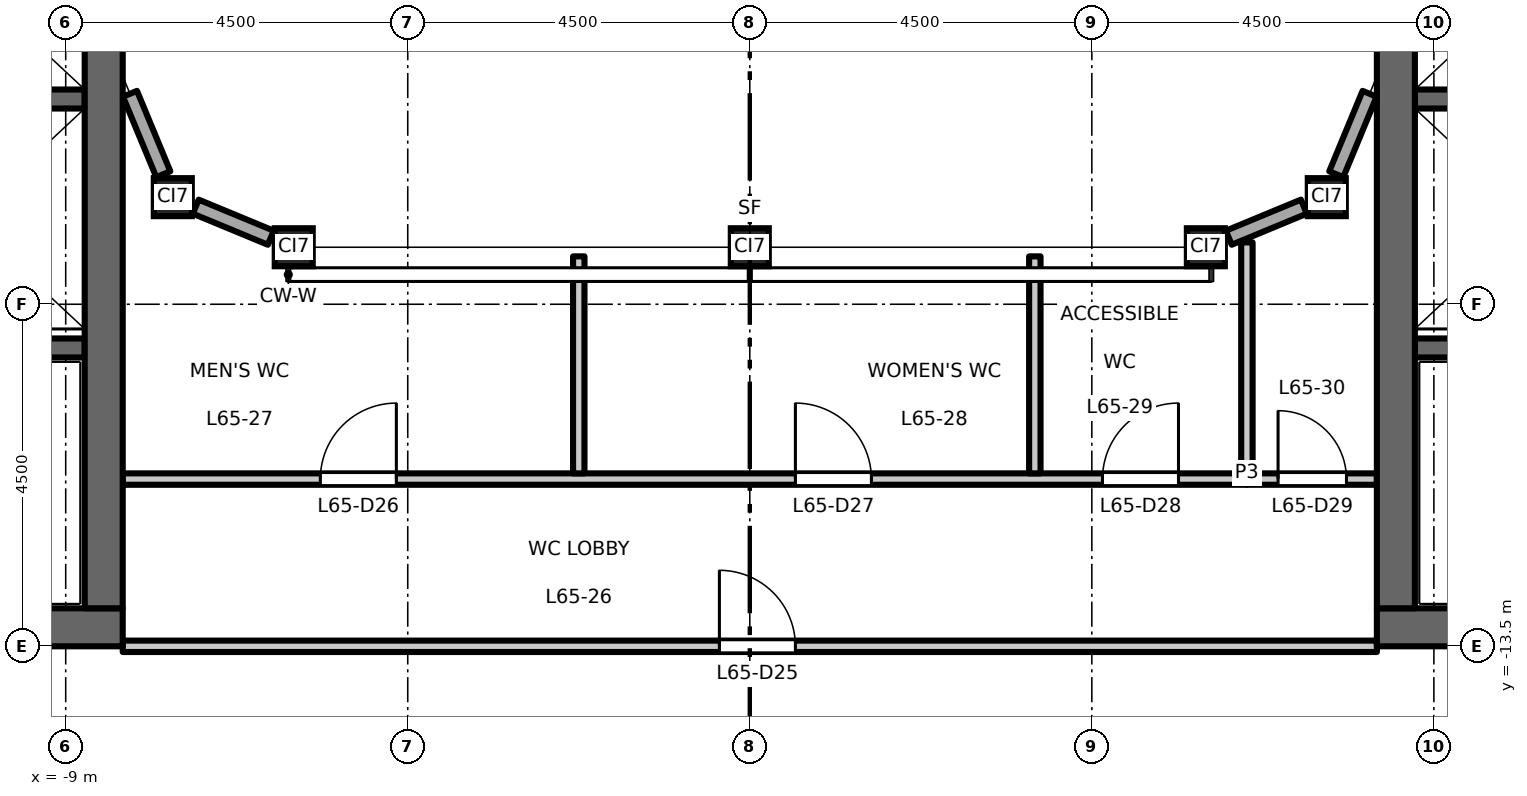
"""IFC4 building model, lengths in metres.
Left out: names, types, materials, properties, quantities, classifications, styles, units other than length and angle.
Written with IfcOpenShell. Run it as: python <this file> out.ifc"""

import sys

from ifc_helpers import new_model, si_unit, direction, frame, frame_2d, origin, origin_2d, place, context, subcontext, project, spatial, rectangle, hollow_rectangle, extrude, element, fill, save


model = new_model("IFC4")
c1 = context("Model", 3, precision=1e-05, world=origin(), true_north=direction((0.0, 1.0)))
c2 = subcontext(c1, "Body", "Model", "MODEL_VIEW")
j1 = project(units=[si_unit("LENGTHUNIT", "METRE"), si_unit("PLANEANGLEUNIT", "RADIAN")], contexts=[c1])
p1 = place(None, origin())
s1 = spatial("IfcSite", under=j1, at=p1, CompositionType="ELEMENT")
p2 = place(p1, origin())
s2 = spatial("IfcBuilding", under=s1, at=p2, CompositionType="ELEMENT")
p3 = place(p2, frame((0.0, 0.0, 303.2)))
s3 = spatial("IfcBuildingStorey", under=s2, at=p3, CompositionType="ELEMENT", Elevation=303.2)
for number, where, z_axis, x_axis in (
    (1, (-7.591, -7.591, 0.0), (0.0, 0.0, 1.0), (1.0, 0.0, 0.0)),
    (2, (-6.0, -8.25, 0.0), (0.0, 0.0, 1.0), (1.0, 0.0, 0.0)),
    (3, (0.0, -8.25, 0.0), (0.0, 0.0, 1.0), (1.0, 0.0, 0.0)),
    (4, (6.0, -8.25, 0.0), (0.0, 0.0, 1.0), (1.0, 0.0, 0.0)),
    (5, (7.591, -7.591, 0.0), (0.0, 0.0, 1.0), (1.0, 0.0, 0.0)),
):
    element("IfcColumn", number, at=place(p3, frame(where, z_axis=z_axis, x_axis=x_axis)), inside=s3, PredefinedType="COLUMN", context=c2, shape_type="SweptSolid", body=[
        extrude(hollow_rectangle(XDim=0.5, YDim=0.5, WallThickness=0.025, at=origin_2d()), origin(), (0.0, 0.0, 1.0), 4.5),
    ])
p4 = place(p3, frame((-8.75, -6.3, 0.0), z_axis=(0.0, 0.0, 1.0), x_axis=(-1.0, 0.0, 0.0)))
e6 = element("IfcWall", 6, at=p4, inside=s3, PredefinedType="SHEAR", context=c2, shape_type="SweptSolid", body=[
    extrude(rectangle(XDim=3.1, YDim=0.25, at=frame_2d((1.55, 0.0))), origin(), (0.0, 0.0, 1.0), 4.35),
])
p5 = place(p3, frame((-8.75, -9.575, 0.0), z_axis=(0.0, 0.0, 1.0), x_axis=(-1.0, 0.0, 0.0)))
e7 = element("IfcWall", 7, at=p5, inside=s3, PredefinedType="SHEAR", context=c2, shape_type="SweptSolid", body=[
    extrude(rectangle(XDim=8.0, YDim=0.25, at=frame_2d((4.0, 0.0))), origin(), (0.0, 0.0, 1.0), 4.35),
])
p6 = place(p5, frame((6.65, 0.0, 0.0)))
e8 = element("IfcOpeningElement", 8, at=p6, cuts=e7, PredefinedType="OPENING", context=c2, shape_type="SweptSolid", body=[
    extrude(rectangle(XDim=1.1, YDim=2.1, at=frame_2d((0.55, 1.05))), frame((0.0, 0.135, 0.0), z_axis=(0.0, -1.0, 0.0), x_axis=(1.0, 0.0, 0.0)), (0.0, 0.0, 1.0), 0.27),
])
p7 = place(p3, frame((-8.25, -13.25, 0.0), z_axis=(0.0, 0.0, 1.0), x_axis=(-1.0, 0.0, 0.0)))
e9 = element("IfcWall", 9, at=p7, inside=s3, PredefinedType="SHEAR", context=c2, shape_type="SweptSolid", body=[
    extrude(rectangle(XDim=9.0, YDim=0.5, at=frame_2d((4.5, 0.0))), origin(), (0.0, 0.0, 1.0), 4.35),
])
p8 = place(p3, frame((-8.5, -13.0, 0.0), z_axis=(0.0, 0.0, 1.0), x_axis=(0.0, 1.0, 0.0)))
e10 = element("IfcWall", 10, at=p8, inside=s3, PredefinedType="SHEAR", context=c2, shape_type="SweptSolid", body=[
    extrude(rectangle(XDim=26.0, YDim=0.5, at=frame_2d((13.0, 0.0))), origin(), (0.0, 0.0, 1.0), 4.35),
])
p9 = place(p3, frame((8.75, -6.3, 0.0), z_axis=(0.0, 0.0, 1.0), x_axis=(1.0, 0.0, 0.0)))
e11 = element("IfcWall", 11, at=p9, inside=s3, PredefinedType="SHEAR", context=c2, shape_type="SweptSolid", body=[
    extrude(rectangle(XDim=3.1, YDim=0.25, at=frame_2d((1.55, 0.0))), origin(), (0.0, 0.0, 1.0), 4.35),
])
p10 = place(p3, frame((8.75, -9.575, 0.0), z_axis=(0.0, 0.0, 1.0), x_axis=(1.0, 0.0, 0.0)))
e12 = element("IfcWall", 12, at=p10, inside=s3, PredefinedType="SHEAR", context=c2, shape_type="SweptSolid", body=[
    extrude(rectangle(XDim=8.0, YDim=0.25, at=frame_2d((4.0, 0.0))), origin(), (0.0, 0.0, 1.0), 4.35),
])
p11 = place(p10, frame((6.65, 0.0, 0.0)))
e13 = element("IfcOpeningElement", 13, at=p11, cuts=e12, PredefinedType="OPENING", context=c2, shape_type="SweptSolid", body=[
    extrude(rectangle(XDim=1.1, YDim=2.1, at=frame_2d((0.55, 1.05))), frame((0.0, 0.135, 0.0), z_axis=(0.0, -1.0, 0.0), x_axis=(1.0, 0.0, 0.0)), (0.0, 0.0, 1.0), 0.27),
])
p12 = place(p3, frame((8.25, -13.25, 0.0), z_axis=(0.0, 0.0, 1.0), x_axis=(1.0, 0.0, 0.0)))
e14 = element("IfcWall", 14, at=p12, inside=s3, PredefinedType="SHEAR", context=c2, shape_type="SweptSolid", body=[
    extrude(rectangle(XDim=9.0, YDim=0.5, at=frame_2d((4.5, 0.0))), origin(), (0.0, 0.0, 1.0), 4.35),
])
p13 = place(p3, frame((8.5, -13.0, 0.0), z_axis=(0.0, 0.0, 1.0), x_axis=(0.0, 1.0, 0.0)))
e15 = element("IfcWall", 15, at=p13, inside=s3, PredefinedType="SHEAR", context=c2, shape_type="SweptSolid", body=[
    extrude(rectangle(XDim=26.0, YDim=0.5, at=frame_2d((13.0, 0.0))), origin(), (0.0, 0.0, 1.0), 4.35),
])
p14 = place(p3, frame((6.302, -8.125, 0.0), z_axis=(0.0, 0.0, 1.0), x_axis=(0.923919409248, 0.382587147216, 0.0)))
e16 = element("IfcWall", 16, at=p14, inside=s3, PredefinedType="STANDARD", context=c2, shape_type="SweptSolid", body=[
    extrude(rectangle(XDim=1.069, YDim=0.2, at=frame_2d((0.534, 0.0))), origin(), (0.0, 0.0, 1.0), 4.01),
])
for number, where, z_axis, x_axis in (
    (17, (7.716, -7.289, 0.0), (0.0, 0.0, 1.0), (0.383, 0.924, 0.0)),
    (18, (-8.154, -6.231, 0.0), (0.0, 0.0, 1.0), (0.383, -0.924, 0.0)),
):
    element("IfcWall", number, at=place(p3, frame(where, z_axis=z_axis, x_axis=x_axis)), inside=s3, PredefinedType="STANDARD", context=c2, shape_type="SweptSolid", body=[
        extrude(rectangle(XDim=1.146, YDim=0.2, at=frame_2d((0.573, 0.0))), origin(), (0.0, 0.0, 1.0), 4.01),
    ])
p15 = place(p3, frame((-7.289, -7.716, 0.0), z_axis=(0.0, 0.0, 1.0), x_axis=(0.923919409248, -0.382587147216, 0.0)))
e19 = element("IfcWall", 19, at=p15, inside=s3, PredefinedType="STANDARD", context=c2, shape_type="SweptSolid", body=[
    extrude(rectangle(XDim=1.069, YDim=0.2, at=frame_2d((0.534, 0.0))), origin(), (0.0, 0.0, 1.0), 4.01),
])
p16 = place(p3, frame((-8.25, -13.5, 0.0), z_axis=(0.0, 0.0, 1.0), x_axis=(1.0, 0.0, 0.0)))
e20 = element("IfcWall", 20, at=p16, inside=s3, PredefinedType="PARTITIONING", context=c2, shape_type="SweptSolid", body=[
    extrude(rectangle(XDim=16.5, YDim=0.15, at=frame_2d((8.25, 0.0))), origin(), (0.0, 0.0, 1.0), 4.35),
])
p17 = place(p16, frame((7.85, 0.0, 0.0)))
e21 = element("IfcOpeningElement", 21, at=p17, cuts=e20, PredefinedType="OPENING", context=c2, shape_type="SweptSolid", body=[
    extrude(rectangle(XDim=1.0, YDim=2.1, at=frame_2d((0.5, 1.05))), frame((0.0, 0.085, 0.0), z_axis=(0.0, -1.0, 0.0), x_axis=(1.0, 0.0, 0.0)), (0.0, 0.0, 1.0), 0.17),
])
p18 = place(p3, frame((-8.25, -11.3, 0.0), z_axis=(0.0, 0.0, 1.0), x_axis=(1.0, 0.0, 0.0)))
e22 = element("IfcWall", 22, at=p18, inside=s3, PredefinedType="PARTITIONING", context=c2, shape_type="SweptSolid", body=[
    extrude(rectangle(XDim=14.79, YDim=0.15, at=frame_2d((7.395, 0.0))), origin(), (0.0, 0.0, 1.0), 4.35),
])
p19 = place(p18, frame((2.6, 0.0, 0.0)))
e23 = element("IfcOpeningElement", 23, at=p19, cuts=e22, PredefinedType="OPENING", context=c2, shape_type="SweptSolid", body=[
    extrude(rectangle(XDim=1.0, YDim=2.1, at=frame_2d((0.5, 1.05))), frame((0.0, 0.085, 0.0), z_axis=(0.0, -1.0, 0.0), x_axis=(1.0, 0.0, 0.0)), (0.0, 0.0, 1.0), 0.17),
])
p20 = place(p18, frame((8.85, 0.0, 0.0)))
e24 = element("IfcOpeningElement", 24, at=p20, cuts=e22, PredefinedType="OPENING", context=c2, shape_type="SweptSolid", body=[
    extrude(rectangle(XDim=1.0, YDim=2.1, at=frame_2d((0.5, 1.05))), frame((0.0, 0.085, 0.0), z_axis=(0.0, -1.0, 0.0), x_axis=(1.0, 0.0, 0.0)), (0.0, 0.0, 1.0), 0.17),
])
p21 = place(p18, frame((12.89, 0.0, 0.0)))
e25 = element("IfcOpeningElement", 25, at=p21, cuts=e22, PredefinedType="OPENING", context=c2, shape_type="SweptSolid", body=[
    extrude(rectangle(XDim=1.0, YDim=2.1, at=frame_2d((0.5, 1.05))), frame((0.0, 0.085, 0.0), z_axis=(0.0, -1.0, 0.0), x_axis=(1.0, 0.0, 0.0)), (0.0, 0.0, 1.0), 0.17),
])
p22 = place(p3, frame((6.54, -11.3, 0.0), z_axis=(0.0, 0.0, 1.0), x_axis=(1.0, 0.0, 0.0)))
e26 = element("IfcWall", 26, at=p22, inside=s3, PredefinedType="PARTITIONING", context=c2, shape_type="SweptSolid", body=[
    extrude(rectangle(XDim=1.71, YDim=0.15, at=frame_2d((0.855, 0.0))), origin(), (0.0, 0.0, 1.0), 4.35),
])
p23 = place(p22, frame((0.41, 0.0, 0.0)))
e27 = element("IfcOpeningElement", 27, at=p23, cuts=e26, PredefinedType="OPENING", context=c2, shape_type="SweptSolid", body=[
    extrude(rectangle(XDim=0.9, YDim=2.1, at=frame_2d((0.45, 1.05))), frame((0.0, 0.085, 0.0), z_axis=(0.0, -1.0, 0.0), x_axis=(1.0, 0.0, 0.0)), (0.0, 0.0, 1.0), 0.17),
])
for number, where, z_axis, x_axis in (
    (28, (-2.25, -11.225, 0.0), (0.0, 0.0, 1.0), (0.0, 1.0, 0.0)),
    (29, (3.75, -11.225, 0.0), (0.0, 0.0, 1.0), (0.0, 1.0, 0.0)),
):
    element("IfcWall", number, at=place(p3, frame(where, z_axis=z_axis, x_axis=x_axis)), inside=s3, PredefinedType="PARTITIONING", context=c2, shape_type="SweptSolid", body=[
        extrude(rectangle(XDim=2.855, YDim=0.15, at=frame_2d((1.427, 0.0))), origin(), (0.0, 0.0, 1.0), 4.35),
    ])
p24 = place(p3, frame((6.54, -11.225, 0.0), z_axis=(0.0, 0.0, 1.0), x_axis=(0.0, 1.0, 0.0)))
e30 = element("IfcWall", 30, at=p24, inside=s3, PredefinedType="PARTITIONING", context=c2, shape_type="SweptSolid", body=[
    extrude(rectangle(XDim=3.039, YDim=0.15, at=frame_2d((1.52, 0.0))), origin(), (0.0, 0.0, 1.0), 4.35),
])
p25 = place(p17, origin())
e31 = element("IfcDoor", 31, at=p25, inside=s3, OperationType="SINGLE_SWING_LEFT", PredefinedType="DOOR", context=c2, shape_type="SweptSolid", body=[
    extrude(rectangle(XDim=1.0, YDim=2.1, at=frame_2d((0.5, 1.05))), frame((0.0, 0.025, 0.0), z_axis=(0.0, -1.0, 0.0), x_axis=(1.0, 0.0, 0.0)), (0.0, 0.0, 1.0), 0.05),
])
fill(e21, e31)
p26 = place(p19, origin())
e32 = element("IfcDoor", 32, at=p26, inside=s3, OperationType="SINGLE_SWING_RIGHT", PredefinedType="DOOR", context=c2, shape_type="SweptSolid", body=[
    extrude(rectangle(XDim=1.0, YDim=2.1, at=frame_2d((0.5, 1.05))), frame((0.0, 0.025, 0.0), z_axis=(0.0, -1.0, 0.0), x_axis=(1.0, 0.0, 0.0)), (0.0, 0.0, 1.0), 0.05),
])
fill(e23, e32)
p27 = place(p20, origin())
e33 = element("IfcDoor", 33, at=p27, inside=s3, OperationType="SINGLE_SWING_LEFT", PredefinedType="DOOR", context=c2, shape_type="SweptSolid", body=[
    extrude(rectangle(XDim=1.0, YDim=2.1, at=frame_2d((0.5, 1.05))), frame((0.0, 0.025, 0.0), z_axis=(0.0, -1.0, 0.0), x_axis=(1.0, 0.0, 0.0)), (0.0, 0.0, 1.0), 0.05),
])
fill(e24, e33)
p28 = place(p21, origin())
e34 = element("IfcDoor", 34, at=p28, inside=s3, OperationType="SINGLE_SWING_RIGHT", PredefinedType="DOOR", context=c2, shape_type="SweptSolid", body=[
    extrude(rectangle(XDim=1.0, YDim=2.1, at=frame_2d((0.5, 1.05))), frame((0.0, 0.025, 0.0), z_axis=(0.0, -1.0, 0.0), x_axis=(1.0, 0.0, 0.0)), (0.0, 0.0, 1.0), 0.05),
])
fill(e25, e34)
p29 = place(p23, origin())
e35 = element("IfcDoor", 35, at=p29, inside=s3, OperationType="SINGLE_SWING_LEFT", PredefinedType="DOOR", context=c2, shape_type="SweptSolid", body=[
    extrude(rectangle(XDim=0.9, YDim=2.1, at=frame_2d((0.45, 1.05))), frame((0.0, 0.025, 0.0), z_axis=(0.0, -1.0, 0.0), x_axis=(1.0, 0.0, 0.0)), (0.0, 0.0, 1.0), 0.05),
])
fill(e27, e35)
save(model, sys.argv[1])
